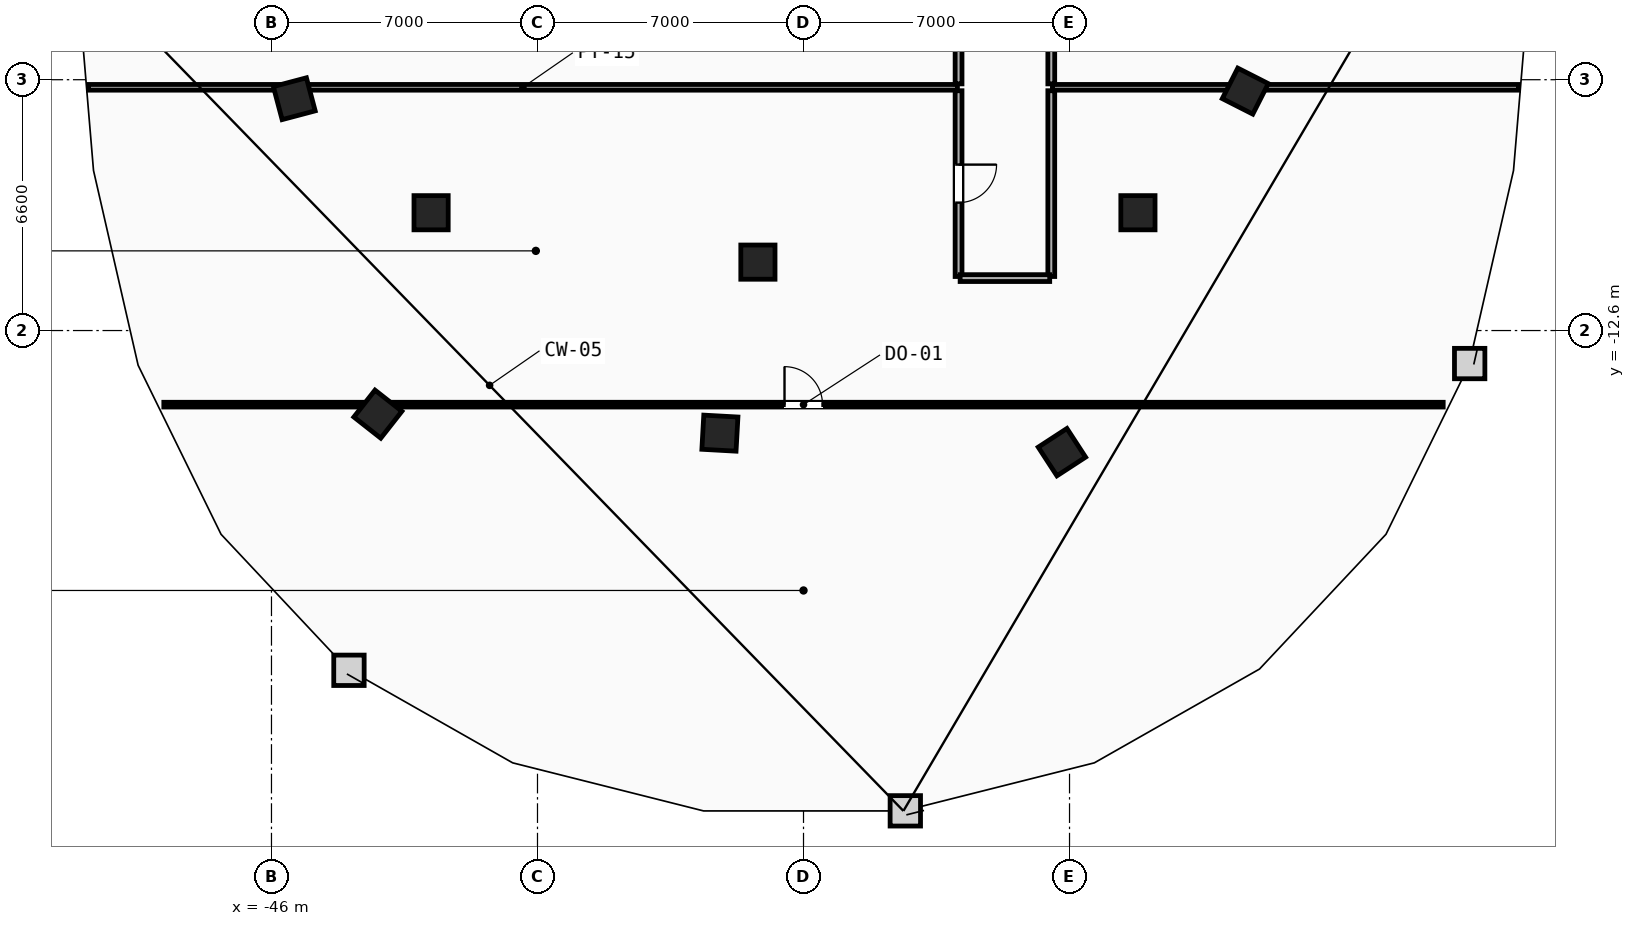
"""IFC4 building model, lengths in metres.
Left out: names, types, materials, properties, quantities, classifications, styles, units other than length and angle.
Written with IfcOpenShell. Run it as: python <this file> out.ifc"""

import sys

from ifc_helpers import new_model, si_unit, direction, frame, frame_2d, origin, origin_2d, place, context, subcontext, project, spatial, rectangle, extrude, element, fill, save


model = new_model("IFC4")
c1 = context("Model", 3, precision=1e-05, world=origin(), true_north=direction((0.0, 1.0)))
c2 = subcontext(c1, "Body", "Model", "MODEL_VIEW")
j1 = project(units=[si_unit("LENGTHUNIT", "METRE"), si_unit("PLANEANGLEUNIT", "RADIAN")], contexts=[c1])
p1 = place(None, origin())
s1 = spatial("IfcSite", under=j1, at=p1, CompositionType="ELEMENT")
p2 = place(p1, origin())
s2 = spatial("IfcBuilding", under=s1, at=p2, CompositionType="ELEMENT")
p3 = place(p2, frame((0.0, 0.0, 224.2)))
s3 = spatial("IfcBuildingStorey", under=s2, at=p3, CompositionType="ELEMENT", Elevation=224.2)
for number, where, z_axis, x_axis in (
    (1, (-41.8, -9.5, 0.0), (0.0, 0.0, 1.0), (1.0, 0.0, 0.0)),
    (2, (-33.2, -10.8, 0.0), (0.0, 0.0, 1.0), (1.0, 0.0, 0.0)),
    (3, (-23.2, -9.5, 0.0), (0.0, 0.0, 1.0), (1.0, 0.0, 0.0)),
    (4, (-45.4, -6.5, 0.0), (0.0, 0.0, 1.0), (0.256, -0.967, 0.0)),
    (5, (-43.2, -14.8, 0.0), (0.0, 0.0, 1.0), (0.786, -0.618, 0.0)),
    (6, (-34.2, -15.3, 0.0), (0.0, 0.0, 1.0), (0.998, -0.055, 0.0)),
    (7, (-25.2, -15.8, 0.0), (0.0, 0.0, 1.0), (0.838, 0.546, 0.0)),
    (8, (-20.375, -6.3, 0.0), (0.0, 0.0, 1.0), (0.453, 0.892, 0.0)),
):
    element("IfcColumn", number, at=place(p3, frame(where, z_axis=z_axis, x_axis=x_axis)), inside=s3, PredefinedType="COLUMN", context=c2, shape_type="SweptSolid", body=[
        extrude(rectangle(XDim=0.9, YDim=0.9, at=origin_2d()), origin(), (0.0, 0.0, 1.0), 3.6),
    ])
p4 = place(p3, frame((-50.817, -6.2, 0.0), z_axis=(0.0, 0.0, 1.0), x_axis=(1.0, 0.0, 0.0)))
e9 = element("IfcWall", 9, at=p4, inside=s3, PredefinedType="PARTITIONING", context=c2, shape_type="SweptSolid", body=[
    extrude(rectangle(XDim=22.867, YDim=0.15, at=frame_2d((11.434, 0.0))), origin(), (0.0, 0.0, 1.0), 3.34),
])
p5 = place(p3, frame((-25.45, -6.2, 0.0), z_axis=(0.0, 0.0, 1.0), x_axis=(1.0, 0.0, 0.0)))
e10 = element("IfcWall", 10, at=p5, inside=s3, PredefinedType="PARTITIONING", context=c2, shape_type="SweptSolid", body=[
    extrude(rectangle(XDim=12.267, YDim=0.15, at=frame_2d((6.133, 0.0))), origin(), (0.0, 0.0, 1.0), 3.34),
])
p6 = place(p3, frame((-27.92, -6.29, 0.0), z_axis=(0.0, 0.0, 1.0), x_axis=(0.0, -1.0, 0.0)))
e11 = element("IfcWall", 11, at=p6, inside=s3, PredefinedType="PARTITIONING", context=c2, shape_type="SweptSolid", body=[
    extrude(rectangle(XDim=4.888, YDim=0.18, at=frame_2d((2.444, 0.0))), origin(), (0.0, 0.0, 1.0), 3.34),
])
p7 = place(p6, frame((1.944, 0.0, 0.0)))
e12 = element("IfcOpeningElement", 12, at=p7, cuts=e11, PredefinedType="OPENING", context=c2, shape_type="SweptSolid", body=[
    extrude(rectangle(XDim=1.0, YDim=2.15, at=frame_2d((0.5, 1.075))), frame((0.0, 0.1, 0.0), z_axis=(0.0, -1.0, 0.0), x_axis=(1.0, 0.0, 0.0)), (0.0, 0.0, 1.0), 0.2),
])
p8 = place(p3, frame((-25.48, -11.178, 0.0), z_axis=(0.0, 0.0, 1.0), x_axis=(0.0, 1.0, 0.0)))
e13 = element("IfcWall", 13, at=p8, inside=s3, PredefinedType="PARTITIONING", context=c2, shape_type="SweptSolid", body=[
    extrude(rectangle(XDim=4.888, YDim=0.18, at=frame_2d((2.444, 0.0))), origin(), (0.0, 0.0, 1.0), 3.34),
])
p9 = place(p3, frame((-27.878, -11.22, 0.0), z_axis=(0.0, 0.0, 1.0), x_axis=(1.0, 0.0, 0.0)))
e14 = element("IfcWall", 14, at=p9, inside=s3, PredefinedType="PARTITIONING", context=c2, shape_type="SweptSolid", body=[
    extrude(rectangle(XDim=2.357, YDim=0.18, at=frame_2d((1.178, 0.0))), origin(), (0.0, 0.0, 1.0), 3.34),
])
p10 = place(p3, frame((-27.92, -0.45, 0.0), z_axis=(0.0, 0.0, 1.0), x_axis=(0.0, -1.0, 0.0)))
e15 = element("IfcWall", 15, at=p10, inside=s3, PredefinedType="PARTITIONING", context=c2, shape_type="SweptSolid", body=[
    extrude(rectangle(XDim=5.66, YDim=0.18, at=frame_2d((2.83, 0.0))), origin(), (0.0, 0.0, 1.0), 3.34),
])
p11 = place(p10, frame((2.33, 0.0, 0.0)))
e16 = element("IfcOpeningElement", 16, at=p11, cuts=e15, PredefinedType="OPENING", context=c2, shape_type="SweptSolid", body=[
    extrude(rectangle(XDim=1.0, YDim=2.15, at=frame_2d((0.5, 1.075))), frame((0.0, 0.1, 0.0), z_axis=(0.0, -1.0, 0.0), x_axis=(1.0, 0.0, 0.0)), (0.0, 0.0, 1.0), 0.2),
])
p12 = place(p3, frame((-25.48, -6.11, 0.0), z_axis=(0.0, 0.0, 1.0), x_axis=(0.0, 1.0, 0.0)))
e17 = element("IfcWall", 17, at=p12, inside=s3, PredefinedType="PARTITIONING", context=c2, shape_type="SweptSolid", body=[
    extrude(rectangle(XDim=5.66, YDim=0.18, at=frame_2d((2.83, 0.0))), origin(), (0.0, 0.0, 1.0), 3.34),
])
p13 = place(p3, frame((-48.833, -14.55, 0.0), z_axis=(0.0, 0.0, 1.0), x_axis=(1.0, 0.0, 0.0)))
e18 = element("IfcWall", 18, at=p13, inside=s3, PredefinedType="PARTITIONING", context=c2, shape_type="SweptSolid", body=[
    extrude(rectangle(XDim=33.666, YDim=0.125, at=frame_2d((16.833, 0.0))), origin(), (0.0, 0.0, 1.0), 3.34),
])
p14 = place(p13, frame((16.333, 0.0, 0.0)))
e19 = element("IfcOpeningElement", 19, at=p14, cuts=e18, PredefinedType="OPENING", context=c2, shape_type="SweptSolid", body=[
    extrude(rectangle(XDim=1.0, YDim=2.15, at=frame_2d((0.5, 1.075))), frame((0.0, 0.073, 0.0), z_axis=(0.0, -1.0, 0.0), x_axis=(1.0, 0.0, 0.0)), (0.0, 0.0, 1.0), 0.145),
])
p15 = place(p14, origin())
e20 = element("IfcDoor", 20, at=p15, inside=s3, OperationType="SINGLE_SWING_LEFT", PredefinedType="DOOR", context=c2, shape_type="SweptSolid", body=[
    extrude(rectangle(XDim=1.0, YDim=2.15, at=frame_2d((0.5, 1.075))), frame((0.0, 0.025, 0.0), z_axis=(0.0, -1.0, 0.0), x_axis=(1.0, 0.0, 0.0)), (0.0, 0.0, 1.0), 0.05),
])
fill(e19, e20)
p16 = place(p7, origin())
e21 = element("IfcDoor", 21, at=p16, inside=s3, OperationType="SINGLE_SWING_LEFT", PredefinedType="DOOR", context=c2, shape_type="SweptSolid", body=[
    extrude(rectangle(XDim=1.0, YDim=2.15, at=frame_2d((0.5, 1.075))), frame((0.0, 0.025, 0.0), z_axis=(0.0, -1.0, 0.0), x_axis=(1.0, 0.0, 0.0)), (0.0, 0.0, 1.0), 0.05),
])
fill(e12, e21)
save(model, sys.argv[1])
